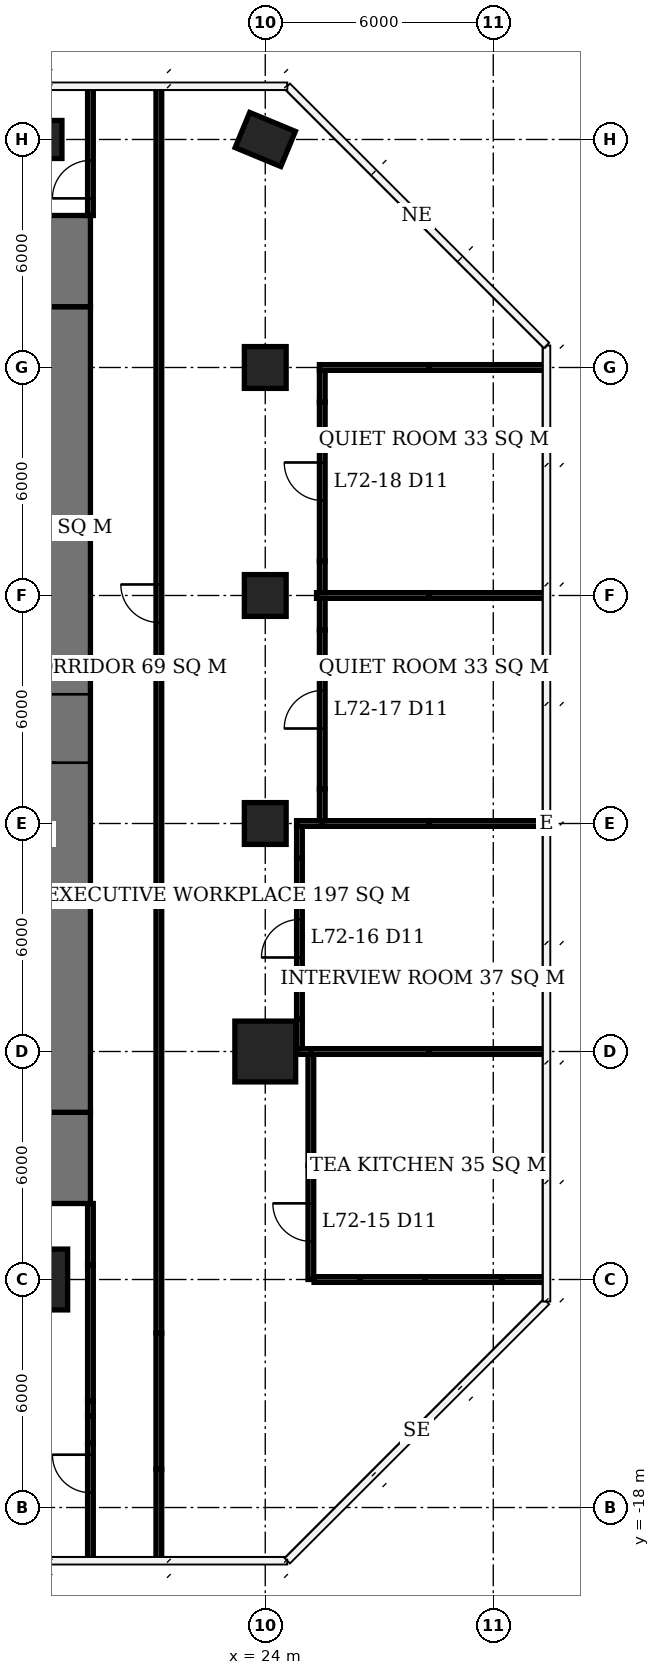
"""IFC4 building model, lengths in metres.
Left out: names, types, materials, properties, quantities, classifications, styles, units other than length and angle.
Written with IfcOpenShell. Run it as: python <this file> out.ifc"""

import sys

from ifc_helpers import new_model, si_unit, direction, frame, frame_2d, origin, origin_2d, place, context, subcontext, project, spatial, rectangle, extrude, element, fill, save


model = new_model("IFC4")
c1 = context("Model", 3, precision=1e-05, world=origin(), true_north=direction((0.0, 1.0)))
c2 = subcontext(c1, "Body", "Model", "MODEL_VIEW")
j1 = project(units=[si_unit("LENGTHUNIT", "METRE"), si_unit("PLANEANGLEUNIT", "RADIAN")], contexts=[c1])
p1 = place(None, origin())
s1 = spatial("IfcSite", under=j1, at=p1, CompositionType="ELEMENT")
p2 = place(p1, origin())
s2 = spatial("IfcBuilding", under=s1, at=p2, CompositionType="ELEMENT")
p3 = place(p2, frame((0.0, 0.0, 291.8)))
s3 = spatial("IfcBuildingStorey", under=s2, at=p3, CompositionType="ELEMENT", Elevation=291.8)
p4 = place(p3, frame((18.0, -12.0, 0.0), z_axis=(0.0, 0.0, 1.0), x_axis=(1.0, 0.0, 0.0)))
e1 = element("IfcColumn", 1, at=p4, inside=s3, PredefinedType="COLUMN", context=c2, shape_type="SweptSolid", body=[
    extrude(rectangle(XDim=1.6, YDim=1.6, at=origin_2d()), origin(), (0.0, 0.0, 1.0), 3.9),
])
p5 = place(p3, frame((18.0, 18.0, 0.0), z_axis=(0.0, 0.0, 1.0), x_axis=(1.0, 0.0, 0.0)))
e2 = element("IfcColumn", 2, at=p5, inside=s3, PredefinedType="COLUMN", context=c2, shape_type="SweptSolid", body=[
    extrude(rectangle(XDim=1.3, YDim=1.0, at=origin_2d()), origin(), (0.0, 0.0, 1.0), 3.9),
])
p6 = place(p3, frame((24.0, -6.0, 0.0), z_axis=(0.0, 0.0, 1.0), x_axis=(1.0, 0.0, 0.0)))
e3 = element("IfcColumn", 3, at=p6, inside=s3, PredefinedType="COLUMN", context=c2, shape_type="SweptSolid", body=[
    extrude(rectangle(XDim=1.6, YDim=1.6, at=origin_2d()), origin(), (0.0, 0.0, 1.0), 3.9),
])
for number, where, z_axis, x_axis in (
    (4, (24.0, 0.0, 0.0), (0.0, 0.0, 1.0), (1.0, 0.0, 0.0)),
    (5, (24.0, 6.0, 0.0), (0.0, 0.0, 1.0), (1.0, 0.0, 0.0)),
    (6, (24.0, 12.0, 0.0), (0.0, 0.0, 1.0), (1.0, 0.0, 0.0)),
):
    element("IfcColumn", number, at=place(p3, frame(where, z_axis=z_axis, x_axis=x_axis)), inside=s3, PredefinedType="COLUMN", context=c2, shape_type="SweptSolid", body=[
        extrude(rectangle(XDim=1.1, YDim=1.1, at=origin_2d()), origin(), (0.0, 0.0, 1.0), 3.9),
    ])
p7 = place(p3, frame((24.0, 18.0, 0.0), z_axis=(0.0, 0.0, 1.0), x_axis=(0.923879532511, -0.382683432365, 0.0)))
e7 = element("IfcColumn", 7, at=p7, inside=s3, PredefinedType="COLUMN", context=c2, shape_type="SweptSolid", body=[
    extrude(rectangle(XDim=1.3, YDim=1.0, at=origin_2d()), origin(), (0.0, 0.0, 1.0), 3.9),
])
p8 = place(p3, frame((18.5, -7.6, 0.0), z_axis=(0.0, 0.0, 1.0), x_axis=(0.0, 1.0, 0.0)))
e8 = element("IfcWall", 8, at=p8, inside=s3, PredefinedType="SHEAR", context=c2, shape_type="SweptSolid", body=[
    extrude(rectangle(XDim=21.2, YDim=1.8, at=frame_2d((10.6, 0.0))), origin(), (0.0, 0.0, 1.0), 3.9),
])
p9 = place(p8, frame((9.2, 0.0, 0.0)))
e9 = element("IfcOpeningElement", 9, at=p9, cuts=e8, PredefinedType="OPENING", context=c2, shape_type="SweptSolid", body=[
    extrude(rectangle(XDim=1.8, YDim=2.4, at=frame_2d((0.9, 1.2))), frame((0.0, 0.91, 0.0), z_axis=(0.0, -1.0, 0.0), x_axis=(1.0, 0.0, 0.0)), (0.0, 0.0, 1.0), 1.82),
])
for number, where, z_axis, x_axis in (
    (10, (18.5, -10.0, 0.0), (0.0, 0.0, 1.0), (0.0, 1.0, 0.0)),
    (11, (18.5, 13.6, 0.0), (0.0, 0.0, 1.0), (0.0, 1.0, 0.0)),
):
    element("IfcWall", number, at=place(p3, frame(where, z_axis=z_axis, x_axis=x_axis)), inside=s3, PredefinedType="SHEAR", context=c2, shape_type="SweptSolid", body=[
        extrude(rectangle(XDim=2.4, YDim=1.8, at=frame_2d((1.2, 0.0))), origin(), (0.0, 0.0, 1.0), 3.9),
    ])
p10 = place(p3, frame((25.285, -12.0, 0.0), z_axis=(0.0, 0.0, 1.0), x_axis=(1.0, 0.0, 0.0)))
e12 = element("IfcWall", 12, at=p10, inside=s3, PredefinedType="PARTITIONING", context=c2, shape_type="SweptSolid", body=[
    extrude(rectangle(XDim=1.205, YDim=0.15, at=frame_2d((0.603, 0.0))), origin(), (0.0, 0.0, 1.0), 2.65),
])
p11 = place(p3, frame((26.49, -12.0, 0.0), z_axis=(0.0, 0.0, 1.0), x_axis=(1.0, 0.0, 0.0)))
e13 = element("IfcWall", 13, at=p11, inside=s3, PredefinedType="PARTITIONING", context=c2, shape_type="SweptSolid", body=[
    extrude(rectangle(XDim=1.718, YDim=0.15, at=frame_2d((0.859, 0.0))), origin(), (0.0, 0.0, 1.0), 3.65),
])
p12 = place(p3, frame((28.208, -12.0, 0.0), z_axis=(0.0, 0.0, 1.0), x_axis=(1.0, 0.0, 0.0)))
e14 = element("IfcWall", 14, at=p12, inside=s3, PredefinedType="PARTITIONING", context=c2, shape_type="SweptSolid", body=[
    extrude(rectangle(XDim=2.029, YDim=0.15, at=frame_2d((1.015, 0.0))), origin(), (0.0, 0.0, 1.0), 2.65),
])
p13 = place(p3, frame((30.237, -12.0, 0.0), z_axis=(0.0, 0.0, 1.0), x_axis=(1.0, 0.0, 0.0)))
e15 = element("IfcWall", 15, at=p13, inside=s3, PredefinedType="PARTITIONING", context=c2, shape_type="SweptSolid", body=[
    extrude(rectangle(XDim=1.138, YDim=0.15, at=frame_2d((0.569, 0.0))), origin(), (0.0, 0.0, 1.0), 3.65),
])
p14 = place(p3, frame((24.825, -6.0, 0.0), z_axis=(0.0, 0.0, 1.0), x_axis=(1.0, 0.0, 0.0)))
e16 = element("IfcWall", 16, at=p14, inside=s3, PredefinedType="PARTITIONING", context=c2, shape_type="SweptSolid", body=[
    extrude(rectangle(XDim=0.45, YDim=0.15, at=frame_2d((0.225, 0.0))), origin(), (0.0, 0.0, 1.0), 2.65),
])
p15 = place(p3, frame((25.2, -6.0, 0.0), z_axis=(0.0, 0.0, 1.0), x_axis=(1.0, 0.0, 0.0)))
e17 = element("IfcWall", 17, at=p15, inside=s3, PredefinedType="PARTITIONING", context=c2, shape_type="SweptSolid", body=[
    extrude(rectangle(XDim=3.11, YDim=0.15, at=frame_2d((1.555, 0.0))), origin(), (0.0, 0.0, 1.0), 2.65),
])
p16 = place(p3, frame((28.31, -6.0, 0.0), z_axis=(0.0, 0.0, 1.0), x_axis=(1.0, 0.0, 0.0)))
e18 = element("IfcWall", 18, at=p16, inside=s3, PredefinedType="PARTITIONING", context=c2, shape_type="SweptSolid", body=[
    extrude(rectangle(XDim=3.065, YDim=0.15, at=frame_2d((1.532, 0.0))), origin(), (0.0, 0.0, 1.0), 3.65),
])
p17 = place(p3, frame((24.825, 0.0, 0.0), z_axis=(0.0, 0.0, 1.0), x_axis=(1.0, 0.0, 0.0)))
e19 = element("IfcWall", 19, at=p17, inside=s3, PredefinedType="PARTITIONING", context=c2, shape_type="SweptSolid", body=[
    extrude(rectangle(XDim=0.75, YDim=0.15, at=frame_2d((0.375, 0.0))), origin(), (0.0, 0.0, 1.0), 2.65),
])
p18 = place(p3, frame((25.5, 0.0, 0.0), z_axis=(0.0, 0.0, 1.0), x_axis=(1.0, 0.0, 0.0)))
e20 = element("IfcWall", 20, at=p18, inside=s3, PredefinedType="PARTITIONING", context=c2, shape_type="SweptSolid", body=[
    extrude(rectangle(XDim=2.81, YDim=0.15, at=frame_2d((1.405, 0.0))), origin(), (0.0, 0.0, 1.0), 2.65),
])
p19 = place(p3, frame((28.31, 0.0, 0.0), z_axis=(0.0, 0.0, 1.0), x_axis=(1.0, 0.0, 0.0)))
e21 = element("IfcWall", 21, at=p19, inside=s3, PredefinedType="PARTITIONING", context=c2, shape_type="SweptSolid", body=[
    extrude(rectangle(XDim=3.04, YDim=0.15, at=frame_2d((1.52, 0.0))), origin(), (0.0, 0.0, 1.0), 3.65),
])
p20 = place(p3, frame((25.35, 6.0, 0.0), z_axis=(0.0, 0.0, 1.0), x_axis=(1.0, 0.0, 0.0)))
e22 = element("IfcWall", 22, at=p20, inside=s3, PredefinedType="PARTITIONING", context=c2, shape_type="SweptSolid", body=[
    extrude(rectangle(XDim=2.96, YDim=0.15, at=frame_2d((1.48, 0.0))), origin(), (0.0, 0.0, 1.0), 2.65),
])
p21 = place(p3, frame((28.31, 6.0, 0.0), z_axis=(0.0, 0.0, 1.0), x_axis=(1.0, 0.0, 0.0)))
e23 = element("IfcWall", 23, at=p21, inside=s3, PredefinedType="PARTITIONING", context=c2, shape_type="SweptSolid", body=[
    extrude(rectangle(XDim=3.065, YDim=0.15, at=frame_2d((1.532, 0.0))), origin(), (0.0, 0.0, 1.0), 3.65),
])
p22 = place(p3, frame((25.425, 12.0, 0.0), z_axis=(0.0, 0.0, 1.0), x_axis=(1.0, 0.0, 0.0)))
e24 = element("IfcWall", 24, at=p22, inside=s3, PredefinedType="PARTITIONING", context=c2, shape_type="SweptSolid", body=[
    extrude(rectangle(XDim=2.885, YDim=0.15, at=frame_2d((1.442, 0.0))), origin(), (0.0, 0.0, 1.0), 2.65),
])
p23 = place(p3, frame((28.31, 12.0, 0.0), z_axis=(0.0, 0.0, 1.0), x_axis=(1.0, 0.0, 0.0)))
e25 = element("IfcWall", 25, at=p23, inside=s3, PredefinedType="PARTITIONING", context=c2, shape_type="SweptSolid", body=[
    extrude(rectangle(XDim=3.065, YDim=0.15, at=frame_2d((1.532, 0.0))), origin(), (0.0, 0.0, 1.0), 3.65),
])
p24 = place(p3, frame((24.9, -5.925, 0.0), z_axis=(0.0, 0.0, 1.0), x_axis=(0.0, 1.0, 0.0)))
e26 = element("IfcWall", 26, at=p24, inside=s3, PredefinedType="PARTITIONING", context=c2, shape_type="SweptSolid", body=[
    extrude(rectangle(XDim=0.783, YDim=0.15, at=frame_2d((0.392, 0.0))), origin(), (0.0, 0.0, 1.0), 2.65),
])
p25 = place(p3, frame((24.9, -5.142, 0.0), z_axis=(0.0, 0.0, 1.0), x_axis=(0.0, 1.0, 0.0)))
e27 = element("IfcWall", 27, at=p25, inside=s3, PredefinedType="PARTITIONING", context=c2, shape_type="SweptSolid", body=[
    extrude(rectangle(XDim=4.232, YDim=0.15, at=frame_2d((2.116, 0.0))), origin(), (0.0, 0.0, 1.0), 3.65),
])
p26 = place(p25, frame((1.616, 0.0, 0.0)))
e28 = element("IfcOpeningElement", 28, at=p26, cuts=e27, PredefinedType="OPENING", context=c2, shape_type="SweptSolid", body=[
    extrude(rectangle(XDim=1.0, YDim=2.4, at=frame_2d((0.5, 1.2))), frame((0.0, 0.085, 0.0), z_axis=(0.0, -1.0, 0.0), x_axis=(1.0, 0.0, 0.0)), (0.0, 0.0, 1.0), 0.17),
])
p27 = place(p3, frame((24.9, -0.91, 0.0), z_axis=(0.0, 0.0, 1.0), x_axis=(0.0, 1.0, 0.0)))
e29 = element("IfcWall", 29, at=p27, inside=s3, PredefinedType="PARTITIONING", context=c2, shape_type="SweptSolid", body=[
    extrude(rectangle(XDim=0.835, YDim=0.15, at=frame_2d((0.417, 0.0))), origin(), (0.0, 0.0, 1.0), 2.65),
])
p28 = place(p3, frame((25.2, -12.0, 0.0), z_axis=(0.0, 0.0, 1.0), x_axis=(0.0, 1.0, 0.0)))
e30 = element("IfcWall", 30, at=p28, inside=s3, PredefinedType="PARTITIONING", context=c2, shape_type="SweptSolid", body=[
    extrude(rectangle(XDim=3.008, YDim=0.15, at=frame_2d((1.504, 0.0))), origin(), (0.0, 0.0, 1.0), 3.65),
])
p29 = place(p28, frame((1.004, 0.0, 0.0)))
e31 = element("IfcOpeningElement", 31, at=p29, cuts=e30, PredefinedType="OPENING", context=c2, shape_type="SweptSolid", body=[
    extrude(rectangle(XDim=1.0, YDim=2.4, at=frame_2d((0.5, 1.2))), frame((0.0, 0.085, 0.0), z_axis=(0.0, -1.0, 0.0), x_axis=(1.0, 0.0, 0.0)), (0.0, 0.0, 1.0), 0.17),
])
p30 = place(p3, frame((25.2, -8.992, 0.0), z_axis=(0.0, 0.0, 1.0), x_axis=(0.0, 1.0, 0.0)))
e32 = element("IfcWall", 32, at=p30, inside=s3, PredefinedType="PARTITIONING", context=c2, shape_type="SweptSolid", body=[
    extrude(rectangle(XDim=2.917, YDim=0.15, at=frame_2d((1.458, 0.0))), origin(), (0.0, 0.0, 1.0), 2.65),
])
p31 = place(p3, frame((25.5, 0.075, 0.0), z_axis=(0.0, 0.0, 1.0), x_axis=(0.0, 1.0, 0.0)))
e33 = element("IfcWall", 33, at=p31, inside=s3, PredefinedType="PARTITIONING", context=c2, shape_type="SweptSolid", body=[
    extrude(rectangle(XDim=0.835, YDim=0.15, at=frame_2d((0.417, 0.0))), origin(), (0.0, 0.0, 1.0), 2.65),
])
p32 = place(p3, frame((25.5, 0.91, 0.0), z_axis=(0.0, 0.0, 1.0), x_axis=(0.0, 1.0, 0.0)))
e34 = element("IfcWall", 34, at=p32, inside=s3, PredefinedType="PARTITIONING", context=c2, shape_type="SweptSolid", body=[
    extrude(rectangle(XDim=4.18, YDim=0.15, at=frame_2d((2.09, 0.0))), origin(), (0.0, 0.0, 1.0), 3.65),
])
p33 = place(p32, frame((1.59, 0.0, 0.0)))
e35 = element("IfcOpeningElement", 35, at=p33, cuts=e34, PredefinedType="OPENING", context=c2, shape_type="SweptSolid", body=[
    extrude(rectangle(XDim=1.0, YDim=2.4, at=frame_2d((0.5, 1.2))), frame((0.0, 0.085, 0.0), z_axis=(0.0, -1.0, 0.0), x_axis=(1.0, 0.0, 0.0)), (0.0, 0.0, 1.0), 0.17),
])
for number, where, z_axis, x_axis in (
    (36, (25.5, 5.09, 0.0), (0.0, 0.0, 1.0), (0.0, 1.0, 0.0)),
    (37, (25.5, 6.075, 0.0), (0.0, 0.0, 1.0), (0.0, 1.0, 0.0)),
):
    element("IfcWall", number, at=place(p3, frame(where, z_axis=z_axis, x_axis=x_axis)), inside=s3, PredefinedType="PARTITIONING", context=c2, shape_type="SweptSolid", body=[
        extrude(rectangle(XDim=0.835, YDim=0.15, at=frame_2d((0.417, 0.0))), origin(), (0.0, 0.0, 1.0), 2.65),
    ])
p34 = place(p3, frame((25.5, 6.91, 0.0), z_axis=(0.0, 0.0, 1.0), x_axis=(0.0, 1.0, 0.0)))
e38 = element("IfcWall", 38, at=p34, inside=s3, PredefinedType="PARTITIONING", context=c2, shape_type="SweptSolid", body=[
    extrude(rectangle(XDim=4.18, YDim=0.15, at=frame_2d((2.09, 0.0))), origin(), (0.0, 0.0, 1.0), 3.65),
])
p35 = place(p34, frame((1.59, 0.0, 0.0)))
e39 = element("IfcOpeningElement", 39, at=p35, cuts=e38, PredefinedType="OPENING", context=c2, shape_type="SweptSolid", body=[
    extrude(rectangle(XDim=1.0, YDim=2.4, at=frame_2d((0.5, 1.2))), frame((0.0, 0.085, 0.0), z_axis=(0.0, -1.0, 0.0), x_axis=(1.0, 0.0, 0.0)), (0.0, 0.0, 1.0), 0.17),
])
p36 = place(p3, frame((25.5, 11.09, 0.0), z_axis=(0.0, 0.0, 1.0), x_axis=(0.0, 1.0, 0.0)))
e40 = element("IfcWall", 40, at=p36, inside=s3, PredefinedType="PARTITIONING", context=c2, shape_type="SweptSolid", body=[
    extrude(rectangle(XDim=0.835, YDim=0.15, at=frame_2d((0.417, 0.0))), origin(), (0.0, 0.0, 1.0), 2.65),
])
p37 = place(p3, frame((19.4, -19.375, 0.0), z_axis=(0.0, 0.0, 1.0), x_axis=(0.0, 1.0, 0.0)))
e41 = element("IfcWall", 41, at=p37, inside=s3, PredefinedType="PARTITIONING", context=c2, shape_type="SweptSolid", body=[
    extrude(rectangle(XDim=3.065, YDim=0.15, at=frame_2d((1.532, 0.0))), origin(), (0.0, 0.0, 1.0), 3.65),
])
p38 = place(p37, frame((1.765, 0.0, 0.0)))
e42 = element("IfcOpeningElement", 42, at=p38, cuts=e41, PredefinedType="OPENING", context=c2, shape_type="SweptSolid", body=[
    extrude(rectangle(XDim=1.0, YDim=2.4, at=frame_2d((0.5, 1.2))), frame((0.0, 0.085, 0.0), z_axis=(0.0, -1.0, 0.0), x_axis=(1.0, 0.0, 0.0)), (0.0, 0.0, 1.0), 0.17),
])
p39 = place(p3, frame((19.4, -16.31, 0.0), z_axis=(0.0, 0.0, 1.0), x_axis=(0.0, 1.0, 0.0)))
e43 = element("IfcWall", 43, at=p39, inside=s3, PredefinedType="PARTITIONING", context=c2, shape_type="SweptSolid", body=[
    extrude(rectangle(XDim=0.72, YDim=0.15, at=frame_2d((0.36, 0.0))), origin(), (0.0, 0.0, 1.0), 2.65),
])
p40 = place(p3, frame((19.4, -15.59, 0.0), z_axis=(0.0, 0.0, 1.0), x_axis=(0.0, 1.0, 0.0)))
e44 = element("IfcWall", 44, at=p40, inside=s3, PredefinedType="PARTITIONING", context=c2, shape_type="SweptSolid", body=[
    extrude(rectangle(XDim=0.398, YDim=0.15, at=frame_2d((0.199, 0.0))), origin(), (0.0, 0.0, 1.0), 3.65),
])
p41 = place(p3, frame((19.4, -15.192, 0.0), z_axis=(0.0, 0.0, 1.0), x_axis=(0.0, 1.0, 0.0)))
e45 = element("IfcWall", 45, at=p41, inside=s3, PredefinedType="PARTITIONING", context=c2, shape_type="SweptSolid", body=[
    extrude(rectangle(XDim=3.584, YDim=0.15, at=frame_2d((1.792, 0.0))), origin(), (0.0, 0.0, 1.0), 2.65),
])
p42 = place(p3, frame((19.4, -11.608, 0.0), z_axis=(0.0, 0.0, 1.0), x_axis=(0.0, 1.0, 0.0)))
e46 = element("IfcWall", 46, at=p42, inside=s3, PredefinedType="PARTITIONING", context=c2, shape_type="SweptSolid", body=[
    extrude(rectangle(XDim=1.608, YDim=0.15, at=frame_2d((0.804, 0.0))), origin(), (0.0, 0.0, 1.0), 3.65),
])
p43 = place(p3, frame((19.4, 16.0, 0.0), z_axis=(0.0, 0.0, 1.0), x_axis=(0.0, 1.0, 0.0)))
e47 = element("IfcWall", 47, at=p43, inside=s3, PredefinedType="PARTITIONING", context=c2, shape_type="SweptSolid", body=[
    extrude(rectangle(XDim=3.375, YDim=0.15, at=frame_2d((1.688, 0.0))), origin(), (0.0, 0.0, 1.0), 3.65),
])
p44 = place(p43, frame((0.45, 0.0, 0.0)))
e48 = element("IfcOpeningElement", 48, at=p44, cuts=e47, PredefinedType="OPENING", context=c2, shape_type="SweptSolid", body=[
    extrude(rectangle(XDim=1.0, YDim=2.1, at=frame_2d((0.5, 1.05))), frame((0.0, 0.085, 0.0), z_axis=(0.0, -1.0, 0.0), x_axis=(1.0, 0.0, 0.0)), (0.0, 0.0, 1.0), 0.17),
])
p45 = place(p3, frame((21.2, -19.375, 0.0), z_axis=(0.0, 0.0, 1.0), x_axis=(0.0, 1.0, 0.0)))
e49 = element("IfcWall", 49, at=p45, inside=s3, PredefinedType="PARTITIONING", context=c2, shape_type="SweptSolid", body=[
    extrude(rectangle(XDim=2.383, YDim=0.15, at=frame_2d((1.191, 0.0))), origin(), (0.0, 0.0, 1.0), 3.65),
])
p46 = place(p3, frame((21.2, -16.992, 0.0), z_axis=(0.0, 0.0, 1.0), x_axis=(0.0, 1.0, 0.0)))
e50 = element("IfcWall", 50, at=p46, inside=s3, PredefinedType="PARTITIONING", context=c2, shape_type="SweptSolid", body=[
    extrude(rectangle(XDim=3.584, YDim=0.15, at=frame_2d((1.792, 0.0))), origin(), (0.0, 0.0, 1.0), 2.65),
])
p47 = place(p3, frame((21.2, -13.408, 0.0), z_axis=(0.0, 0.0, 1.0), x_axis=(0.0, 1.0, 0.0)))
e51 = element("IfcWall", 51, at=p47, inside=s3, PredefinedType="PARTITIONING", context=c2, shape_type="SweptSolid", body=[
    extrude(rectangle(XDim=32.783, YDim=0.15, at=frame_2d((16.392, 0.0))), origin(), (0.0, 0.0, 1.0), 3.65),
])
p48 = place(p47, frame((18.698, 0.0, 0.0)))
e52 = element("IfcOpeningElement", 52, at=p48, cuts=e51, PredefinedType="OPENING", context=c2, shape_type="SweptSolid", body=[
    extrude(rectangle(XDim=1.0, YDim=2.4, at=frame_2d((0.5, 1.2))), frame((0.0, 0.085, 0.0), z_axis=(0.0, -1.0, 0.0), x_axis=(1.0, 0.0, 0.0)), (0.0, 0.0, 1.0), 0.17),
])
p49 = place(p9, origin())
e53 = element("IfcDoor", 53, at=p49, inside=s3, OperationType="DOUBLE_DOOR_SINGLE_SWING", PredefinedType="DOOR", context=c2, shape_type="SweptSolid", body=[
    extrude(rectangle(XDim=1.8, YDim=2.4, at=frame_2d((0.9, 1.2))), frame((0.0, 0.025, 0.0), z_axis=(0.0, -1.0, 0.0), x_axis=(1.0, 0.0, 0.0)), (0.0, 0.0, 1.0), 0.05),
])
fill(e9, e53)
p50 = place(p29, origin())
e54 = element("IfcDoor", 54, at=p50, inside=s3, OperationType="SINGLE_SWING_RIGHT", PredefinedType="DOOR", context=c2, shape_type="SweptSolid", body=[
    extrude(rectangle(XDim=1.0, YDim=2.4, at=frame_2d((0.5, 1.2))), frame((0.0, 0.025, 0.0), z_axis=(0.0, -1.0, 0.0), x_axis=(1.0, 0.0, 0.0)), (0.0, 0.0, 1.0), 0.05),
])
fill(e31, e54)
p51 = place(p26, origin())
e55 = element("IfcDoor", 55, at=p51, inside=s3, OperationType="SINGLE_SWING_LEFT", PredefinedType="DOOR", context=c2, shape_type="SweptSolid", body=[
    extrude(rectangle(XDim=1.0, YDim=2.4, at=frame_2d((0.5, 1.2))), frame((0.0, 0.025, 0.0), z_axis=(0.0, -1.0, 0.0), x_axis=(1.0, 0.0, 0.0)), (0.0, 0.0, 1.0), 0.05),
])
fill(e28, e55)
p52 = place(p33, origin())
e56 = element("IfcDoor", 56, at=p52, inside=s3, OperationType="SINGLE_SWING_LEFT", PredefinedType="DOOR", context=c2, shape_type="SweptSolid", body=[
    extrude(rectangle(XDim=1.0, YDim=2.4, at=frame_2d((0.5, 1.2))), frame((0.0, 0.025, 0.0), z_axis=(0.0, -1.0, 0.0), x_axis=(1.0, 0.0, 0.0)), (0.0, 0.0, 1.0), 0.05),
])
fill(e35, e56)
p53 = place(p35, origin())
e57 = element("IfcDoor", 57, at=p53, inside=s3, OperationType="SINGLE_SWING_RIGHT", PredefinedType="DOOR", context=c2, shape_type="SweptSolid", body=[
    extrude(rectangle(XDim=1.0, YDim=2.4, at=frame_2d((0.5, 1.2))), frame((0.0, 0.025, 0.0), z_axis=(0.0, -1.0, 0.0), x_axis=(1.0, 0.0, 0.0)), (0.0, 0.0, 1.0), 0.05),
])
fill(e39, e57)
p54 = place(p38, origin())
e58 = element("IfcDoor", 58, at=p54, inside=s3, OperationType="SINGLE_SWING_RIGHT", PredefinedType="DOOR", context=c2, shape_type="SweptSolid", body=[
    extrude(rectangle(XDim=1.0, YDim=2.4, at=frame_2d((0.5, 1.2))), frame((0.0, 0.025, 0.0), z_axis=(0.0, -1.0, 0.0), x_axis=(1.0, 0.0, 0.0)), (0.0, 0.0, 1.0), 0.05),
])
fill(e42, e58)
p55 = place(p48, origin())
e59 = element("IfcDoor", 59, at=p55, inside=s3, OperationType="SINGLE_SWING_RIGHT", PredefinedType="DOOR", context=c2, shape_type="SweptSolid", body=[
    extrude(rectangle(XDim=1.0, YDim=2.4, at=frame_2d((0.5, 1.2))), frame((0.0, 0.025, 0.0), z_axis=(0.0, -1.0, 0.0), x_axis=(1.0, 0.0, 0.0)), (0.0, 0.0, 1.0), 0.05),
])
fill(e52, e59)
p56 = place(p44, origin())
e60 = element("IfcDoor", 60, at=p56, inside=s3, OperationType="SINGLE_SWING_LEFT", PredefinedType="DOOR", context=c2, shape_type="SweptSolid", body=[
    extrude(rectangle(XDim=1.0, YDim=2.1, at=frame_2d((0.5, 1.05))), frame((0.0, 0.025, 0.0), z_axis=(0.0, -1.0, 0.0), x_axis=(1.0, 0.0, 0.0)), (0.0, 0.0, 1.0), 0.05),
])
fill(e48, e60)
save(model, sys.argv[1])
